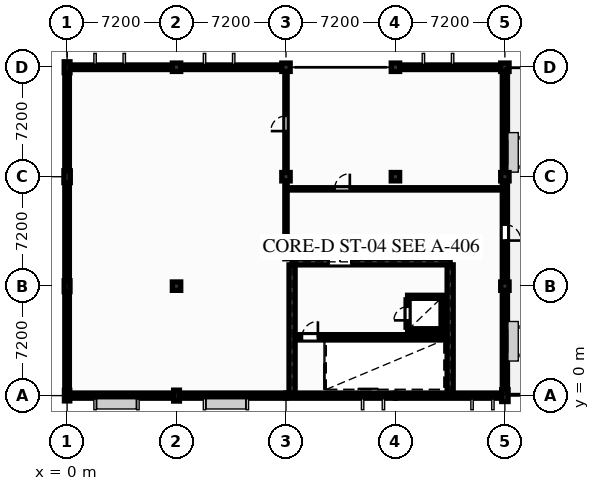
"""IFC4 building model, lengths in metres.
Left out: names, types, materials, properties, quantities, classifications, styles, units other than length and angle.
Written with IfcOpenShell. Run it as: python <this file> out.ifc"""

import sys

from ifc_helpers import new_model, si_unit, direction, frame, frame_2d, origin, origin_with_axes, origin_2d, place, context, subcontext, project, spatial, rectangle, extrude, element, fill, save


model = new_model("IFC4")
c1 = context("Model", 3, precision=1e-05, world=origin(), true_north=direction((0.0, 1.0)))
c2 = subcontext(c1, "Body", "Model", "MODEL_VIEW")
j1 = project(units=[si_unit("LENGTHUNIT", "METRE"), si_unit("PLANEANGLEUNIT", "RADIAN")], contexts=[c1])
p1 = place(None, origin())
s1 = spatial("IfcSite", under=j1, at=p1, CompositionType="ELEMENT")
p2 = place(p1, origin())
s2 = spatial("IfcBuilding", under=s1, at=p2, CompositionType="ELEMENT")
p3 = place(p2, frame((0.0, 0.0, 12.78)))
s3 = spatial("IfcBuildingStorey", under=s2, at=p3, CompositionType="ELEMENT", Elevation=12.78)
p4 = place(p3, frame((0.0, 0.0, 0.0), z_axis=(0.0, 0.0, 1.0), x_axis=(0.0, 1.0, 0.0)))
e1 = element("IfcColumn", 1, at=p4, inside=s3, PredefinedType="PILASTER", context=c2, shape_type="SweptSolid", body=[
    extrude(rectangle(XDim=0.35, YDim=0.7, at=origin_2d()), origin(), (0.0, 0.0, 1.0), 3.74),
])
p5 = place(p3, frame((0.0, 7.2, 0.0), z_axis=(0.0, 0.0, 1.0), x_axis=(1.0, 0.0, 0.0)))
e2 = element("IfcColumn", 2, at=p5, inside=s3, PredefinedType="PILASTER", context=c2, shape_type="SweptSolid", body=[
    extrude(rectangle(XDim=0.38, YDim=0.72, at=origin_2d()), origin(), (0.0, 0.0, 1.0), 3.74),
])
p6 = place(p3, frame((0.0, 14.4, 0.0), z_axis=(0.0, 0.0, 1.0), x_axis=(1.0, 0.0, 0.0)))
e3 = element("IfcColumn", 3, at=p6, inside=s3, PredefinedType="PILASTER", context=c2, shape_type="SweptSolid", body=[
    extrude(rectangle(XDim=0.42, YDim=0.78, at=origin_2d()), origin(), (0.0, 0.0, 1.0), 3.74),
])
for number, where, z_axis, x_axis in (
    (4, (0.0, 21.6, 0.0), (0.0, 0.0, 1.0), (1.0, 0.0, 0.0)),
    (5, (7.2, 0.0, 0.0), (0.0, 0.0, 1.0), (0.0, 1.0, 0.0)),
):
    element("IfcColumn", number, at=place(p3, frame(where, z_axis=z_axis, x_axis=x_axis)), inside=s3, PredefinedType="PILASTER", context=c2, shape_type="SweptSolid", body=[
        extrude(rectangle(XDim=0.38, YDim=0.72, at=origin_2d()), origin(), (0.0, 0.0, 1.0), 3.74),
    ])
for number, where, z_axis, x_axis in (
    (6, (7.2, 7.2, 0.0), (0.0, 0.0, 1.0), (1.0, 0.0, 0.0)),
    (7, (7.2, 21.6, 0.0), (0.0, 0.0, 1.0), (1.0, 0.0, 0.0)),
    (8, (14.4, 14.4, 0.0), (0.0, 0.0, 1.0), (1.0, 0.0, 0.0)),
    (9, (14.4, 21.6, 0.0), (0.0, 0.0, 1.0), (1.0, 0.0, 0.0)),
    (10, (21.6, 14.4, 0.0), (0.0, 0.0, 1.0), (1.0, 0.0, 0.0)),
    (11, (21.6, 21.6, 0.0), (0.0, 0.0, 1.0), (1.0, 0.0, 0.0)),
):
    element("IfcColumn", number, at=place(p3, frame(where, z_axis=z_axis, x_axis=x_axis)), inside=s3, PredefinedType="COLUMN", context=c2, shape_type="SweptSolid", body=[
        extrude(rectangle(XDim=0.55, YDim=0.55, at=origin_2d()), origin(), (0.0, 0.0, 1.0), 3.74),
    ])
p7 = place(p3, frame((28.8, 0.0, 0.0), z_axis=(0.0, 0.0, 1.0), x_axis=(0.0, 1.0, 0.0)))
e12 = element("IfcColumn", 12, at=p7, inside=s3, PredefinedType="PILASTER", context=c2, shape_type="SweptSolid", body=[
    extrude(rectangle(XDim=0.42, YDim=0.78, at=origin_2d()), origin(), (0.0, 0.0, 1.0), 3.74),
])
for number, where, z_axis, x_axis in (
    (13, (28.8, 7.2, 0.0), (0.0, 0.0, 1.0), (1.0, 0.0, 0.0)),
    (14, (28.8, 14.4, 0.0), (0.0, 0.0, 1.0), (1.0, 0.0, 0.0)),
    (15, (28.8, 21.6, 0.0), (0.0, 0.0, 1.0), (1.0, 0.0, 0.0)),
):
    element("IfcColumn", number, at=place(p3, frame(where, z_axis=z_axis, x_axis=x_axis)), inside=s3, PredefinedType="COLUMN", context=c2, shape_type="SweptSolid", body=[
        extrude(rectangle(XDim=0.55, YDim=0.55, at=origin_2d()), origin(), (0.0, 0.0, 1.0), 3.74),
    ])
p8 = place(p3, origin_with_axes())
e16 = element("IfcWall", 16, at=p8, inside=s3, PredefinedType="SOLIDWALL", context=c2, shape_type="SweptSolid", body=[
    extrude(rectangle(XDim=7.2, YDim=0.34, at=frame_2d((3.6, 0.0))), origin(), (0.0, 0.0, 1.0), 3.42),
])
p9 = place(p8, frame((2.0, 0.0, 0.765)))
e17 = element("IfcOpeningElement", 17, at=p9, cuts=e16, PredefinedType="OPENING", context=c2, shape_type="SweptSolid", body=[
    extrude(rectangle(XDim=2.5, YDim=2.0, at=frame_2d((1.25, 1.0))), frame((0.0, 0.18, 0.0), z_axis=(0.0, -1.0, 0.0), x_axis=(1.0, 0.0, 0.0)), (0.0, 0.0, 1.0), 0.36),
])
p10 = place(p3, frame((7.2, 0.0, 0.0), z_axis=(0.0, 0.0, 1.0), x_axis=(1.0, 0.0, 0.0)))
e18 = element("IfcWall", 18, at=p10, inside=s3, PredefinedType="SOLIDWALL", context=c2, shape_type="SweptSolid", body=[
    extrude(rectangle(XDim=7.2, YDim=0.34, at=frame_2d((3.6, 0.0))), origin(), (0.0, 0.0, 1.0), 3.42),
])
p11 = place(p10, frame((2.0, 0.0, 0.85)))
e19 = element("IfcOpeningElement", 19, at=p11, cuts=e18, PredefinedType="OPENING", context=c2, shape_type="SweptSolid", body=[
    extrude(rectangle(XDim=2.5, YDim=2.0, at=frame_2d((1.25, 1.0))), frame((0.0, 0.18, 0.0), z_axis=(0.0, -1.0, 0.0), x_axis=(1.0, 0.0, 0.0)), (0.0, 0.0, 1.0), 0.36),
])
p12 = place(p3, frame((14.4, 0.0, 0.0), z_axis=(0.0, 0.0, 1.0), x_axis=(1.0, 0.0, 0.0)))
e20 = element("IfcWall", 20, at=p12, inside=s3, PredefinedType="SOLIDWALL", context=c2, shape_type="SweptSolid", body=[
    extrude(rectangle(XDim=7.2, YDim=0.34, at=frame_2d((3.6, 0.0))), origin(), (0.0, 0.0, 1.0), 3.42),
])
p13 = place(p12, frame((5.2, 0.0, 1.05)))
e21 = element("IfcOpeningElement", 21, at=p13, cuts=e20, PredefinedType="OPENING", context=c2, shape_type="SweptSolid", body=[
    extrude(rectangle(XDim=1.05, YDim=1.75, at=frame_2d((0.525, 0.875))), frame((0.0, 0.18, 0.0), z_axis=(0.0, -1.0, 0.0), x_axis=(1.0, 0.0, 0.0)), (0.0, 0.0, 1.0), 0.36),
])
p14 = place(p3, frame((21.6, 0.0, 0.0), z_axis=(0.0, 0.0, 1.0), x_axis=(1.0, 0.0, 0.0)))
e22 = element("IfcWall", 22, at=p14, inside=s3, PredefinedType="SOLIDWALL", context=c2, shape_type="SweptSolid", body=[
    extrude(rectangle(XDim=7.2, YDim=0.34, at=frame_2d((3.6, 0.0))), origin(), (0.0, 0.0, 1.0), 3.42),
])
p15 = place(p14, frame((5.2, 0.0, 1.05)))
e23 = element("IfcOpeningElement", 23, at=p15, cuts=e22, PredefinedType="OPENING", context=c2, shape_type="SweptSolid", body=[
    extrude(rectangle(XDim=1.05, YDim=1.75, at=frame_2d((0.525, 0.875))), frame((0.0, 0.18, 0.0), z_axis=(0.0, -1.0, 0.0), x_axis=(1.0, 0.0, 0.0)), (0.0, 0.0, 1.0), 0.36),
])
for number, where, z_axis, x_axis in (
    (24, (0.0, 0.0, 0.0), (0.0, 0.0, 1.0), (0.0, 1.0, 0.0)),
    (25, (0.0, 7.2, 0.0), (0.0, 0.0, 1.0), (0.0, 1.0, 0.0)),
):
    element("IfcWall", number, at=place(p3, frame(where, z_axis=z_axis, x_axis=x_axis)), inside=s3, PredefinedType="SOLIDWALL", context=c2, shape_type="SweptSolid", body=[
        extrude(rectangle(XDim=7.2, YDim=0.3, at=frame_2d((3.6, 0.0))), origin(), (0.0, 0.0, 1.0), 2.805),
    ])
p16 = place(p3, frame((0.0, 14.4, 0.0), z_axis=(0.0, 0.0, 1.0), x_axis=(0.0, 1.0, 0.0)))
e26 = element("IfcWall", 26, at=p16, inside=s3, PredefinedType="SOLIDWALL", context=c2, shape_type="SweptSolid", body=[
    extrude(rectangle(XDim=7.2, YDim=0.3, at=frame_2d((3.6, 0.0))), origin(), (0.0, 0.0, 1.0), 2.805),
])
p17 = place(p3, frame((28.8, 0.0, 0.0), z_axis=(0.0, 0.0, 1.0), x_axis=(0.0, 1.0, 0.0)))
e27 = element("IfcWall", 27, at=p17, inside=s3, PredefinedType="SOLIDWALL", context=c2, shape_type="SweptSolid", body=[
    extrude(rectangle(XDim=21.6, YDim=0.34, at=frame_2d((10.8, 0.0))), origin(), (0.0, 0.0, 1.0), 3.42),
])
p18 = place(p17, frame((10.2, 0.0, 0.0)))
e28 = element("IfcOpeningElement", 28, at=p18, cuts=e27, PredefinedType="OPENING", context=c2, shape_type="SweptSolid", body=[
    extrude(rectangle(XDim=1.05, YDim=2.2, at=frame_2d((0.525, 1.1))), frame((0.0, 0.18, 0.0), z_axis=(0.0, -1.0, 0.0), x_axis=(1.0, 0.0, 0.0)), (0.0, 0.0, 1.0), 0.36),
])
p19 = place(p17, frame((2.8, 0.0, 0.695)))
e29 = element("IfcOpeningElement", 29, at=p19, cuts=e27, PredefinedType="OPENING", context=c2, shape_type="SweptSolid", body=[
    extrude(rectangle(XDim=1.55, YDim=1.95, at=frame_2d((0.775, 0.975))), frame((0.0, 0.18, 0.0), z_axis=(0.0, -1.0, 0.0), x_axis=(1.0, 0.0, 0.0)), (0.0, 0.0, 1.0), 0.36),
])
p20 = place(p17, frame((15.2, 0.0, 0.595)))
e30 = element("IfcOpeningElement", 30, at=p20, cuts=e27, PredefinedType="OPENING", context=c2, shape_type="SweptSolid", body=[
    extrude(rectangle(XDim=1.6, YDim=2.05, at=frame_2d((0.8, 1.025))), frame((0.0, 0.18, 0.0), z_axis=(0.0, -1.0, 0.0), x_axis=(1.0, 0.0, 0.0)), (0.0, 0.0, 1.0), 0.36),
])
p21 = place(p3, frame((0.0, 21.6, 0.0), z_axis=(0.0, 0.0, 1.0), x_axis=(1.0, 0.0, 0.0)))
e31 = element("IfcWall", 31, at=p21, inside=s3, PredefinedType="SOLIDWALL", context=c2, shape_type="SweptSolid", body=[
    extrude(rectangle(XDim=7.2, YDim=0.3, at=frame_2d((3.6, 0.0))), origin(), (0.0, 0.0, 1.0), 2.805),
])
p22 = place(p21, frame((2.0, 0.0, 0.635)))
e32 = element("IfcOpeningElement", 32, at=p22, cuts=e31, PredefinedType="OPENING", context=c2, shape_type="SweptSolid", body=[
    extrude(rectangle(XDim=1.6, YDim=2.05, at=frame_2d((0.8, 1.025))), frame((0.0, 0.16, 0.0), z_axis=(0.0, -1.0, 0.0), x_axis=(1.0, 0.0, 0.0)), (0.0, 0.0, 1.0), 0.32),
])
p23 = place(p3, frame((7.2, 21.6, 0.0), z_axis=(0.0, 0.0, 1.0), x_axis=(1.0, 0.0, 0.0)))
e33 = element("IfcWall", 33, at=p23, inside=s3, PredefinedType="SOLIDWALL", context=c2, shape_type="SweptSolid", body=[
    extrude(rectangle(XDim=7.2, YDim=0.3, at=frame_2d((3.6, 0.0))), origin(), (0.0, 0.0, 1.0), 2.805),
])
p24 = place(p23, frame((2.0, 0.0, 0.635)))
e34 = element("IfcOpeningElement", 34, at=p24, cuts=e33, PredefinedType="OPENING", context=c2, shape_type="SweptSolid", body=[
    extrude(rectangle(XDim=1.6, YDim=2.05, at=frame_2d((0.8, 1.025))), frame((0.0, 0.16, 0.0), z_axis=(0.0, -1.0, 0.0), x_axis=(1.0, 0.0, 0.0)), (0.0, 0.0, 1.0), 0.32),
])
p25 = place(p3, frame((21.6, 21.6, 0.0), z_axis=(0.0, 0.0, 1.0), x_axis=(1.0, 0.0, 0.0)))
e35 = element("IfcWall", 35, at=p25, inside=s3, PredefinedType="SOLIDWALL", context=c2, shape_type="SweptSolid", body=[
    extrude(rectangle(XDim=7.2, YDim=0.3, at=frame_2d((3.6, 0.0))), origin(), (0.0, 0.0, 1.0), 2.805),
])
p26 = place(p25, frame((2.0, 0.0, 0.635)))
e36 = element("IfcOpeningElement", 36, at=p26, cuts=e35, PredefinedType="OPENING", context=c2, shape_type="SweptSolid", body=[
    extrude(rectangle(XDim=1.6, YDim=2.05, at=frame_2d((0.8, 1.025))), frame((0.0, 0.16, 0.0), z_axis=(0.0, -1.0, 0.0), x_axis=(1.0, 0.0, 0.0)), (0.0, 0.0, 1.0), 0.32),
])
p27 = place(p3, frame((14.8, 8.8, 0.0), z_axis=(0.0, 0.0, 1.0), x_axis=(1.0, 0.0, 0.0)))
e37 = element("IfcWall", 37, at=p27, inside=s3, PredefinedType="SHEAR", context=c2, shape_type="SweptSolid", body=[
    extrude(rectangle(XDim=10.4, YDim=0.4, at=frame_2d((5.2, 0.0))), origin(), (0.0, 0.0, 1.0), 3.42),
])
p28 = place(p27, frame((2.4, 0.0, 0.0)))
e38 = element("IfcOpeningElement", 38, at=p28, cuts=e37, PredefinedType="OPENING", context=c2, shape_type="SweptSolid", body=[
    extrude(rectangle(XDim=1.5, YDim=2.2, at=frame_2d((0.75, 1.1))), frame((0.0, 0.21, 0.0), z_axis=(0.0, -1.0, 0.0), x_axis=(1.0, 0.0, 0.0)), (0.0, 0.0, 1.0), 0.42),
])
for number, where, z_axis, x_axis in (
    (39, (14.8, 0.17, 0.0), (0.0, 0.0, 1.0), (0.0, 1.0, 0.0)),
    (40, (25.2, 0.17, 0.0), (0.0, 0.0, 1.0), (0.0, 1.0, 0.0)),
):
    element("IfcWall", number, at=place(p3, frame(where, z_axis=z_axis, x_axis=x_axis)), inside=s3, PredefinedType="SHEAR", context=c2, shape_type="SweptSolid", body=[
        extrude(rectangle(XDim=8.43, YDim=0.4, at=frame_2d((4.215, 0.0))), origin(), (0.0, 0.0, 1.0), 3.42),
    ])
p29 = place(p3, frame((15.0, 3.835, 0.0), z_axis=(0.0, 0.0, 1.0), x_axis=(1.0, 0.0, 0.0)))
e41 = element("IfcWall", 41, at=p29, inside=s3, PredefinedType="SHEAR", context=c2, shape_type="SweptSolid", body=[
    extrude(rectangle(XDim=10.0, YDim=0.35, at=frame_2d((5.0, 0.0))), origin(), (0.0, 0.0, 1.0), 3.42),
])
p30 = place(p29, frame((0.45, 0.0, 0.0)))
e42 = element("IfcOpeningElement", 42, at=p30, cuts=e41, PredefinedType="OPENING", context=c2, shape_type="SweptSolid", body=[
    extrude(rectangle(XDim=1.05, YDim=2.2, at=frame_2d((0.525, 1.1))), frame((0.0, 0.185, 0.0), z_axis=(0.0, -1.0, 0.0), x_axis=(1.0, 0.0, 0.0)), (0.0, 0.0, 1.0), 0.37),
])
for number, where, z_axis, x_axis in (
    (43, (22.4, 4.3, 0.0), (0.0, 0.0, 1.0), (1.0, 0.0, 0.0)),
    (44, (22.4, 6.5, 0.0), (0.0, 0.0, 1.0), (1.0, 0.0, 0.0)),
):
    element("IfcWall", number, at=place(p3, frame(where, z_axis=z_axis, x_axis=x_axis)), inside=s3, PredefinedType="PARTITIONING", context=c2, shape_type="SweptSolid", body=[
        extrude(rectangle(XDim=2.3, YDim=0.2, at=frame_2d((1.15, 0.0))), origin(), (0.0, 0.0, 1.0), 3.42),
    ])
p31 = place(p3, frame((22.4, 4.5, 0.0), z_axis=(0.0, 0.0, 1.0), x_axis=(0.0, 1.0, 0.0)))
e45 = element("IfcWall", 45, at=p31, inside=s3, PredefinedType="PARTITIONING", context=c2, shape_type="SweptSolid", body=[
    extrude(rectangle(XDim=1.8, YDim=0.2, at=frame_2d((0.9, 0.0))), origin(), (0.0, 0.0, 1.0), 3.42),
])
p32 = place(p31, frame((0.45, 0.0, 0.0)))
e46 = element("IfcOpeningElement", 46, at=p32, cuts=e45, PredefinedType="OPENING", context=c2, shape_type="SweptSolid", body=[
    extrude(rectangle(XDim=0.9, YDim=2.1, at=frame_2d((0.45, 1.05))), frame((0.0, 0.11, 0.0), z_axis=(0.0, -1.0, 0.0), x_axis=(1.0, 0.0, 0.0)), (0.0, 0.0, 1.0), 0.22),
])
p33 = place(p3, frame((24.7, 4.5, 0.0), z_axis=(0.0, 0.0, 1.0), x_axis=(0.0, 1.0, 0.0)))
e47 = element("IfcWall", 47, at=p33, inside=s3, PredefinedType="PARTITIONING", context=c2, shape_type="SweptSolid", body=[
    extrude(rectangle(XDim=1.8, YDim=0.2, at=frame_2d((0.9, 0.0))), origin(), (0.0, 0.0, 1.0), 3.42),
])
p34 = place(p3, frame((14.4, 9.0, 0.0), z_axis=(0.0, 0.0, 1.0), x_axis=(0.0, 1.0, 0.0)))
e48 = element("IfcWall", 48, at=p34, inside=s3, PredefinedType="PARTITIONING", context=c2, shape_type="SweptSolid", body=[
    extrude(rectangle(XDim=12.6, YDim=0.15, at=frame_2d((6.3, 0.0))), origin(), (0.0, 0.0, 1.0), 2.685),
])
p35 = place(p34, frame((8.4, 0.0, 0.0)))
e49 = element("IfcOpeningElement", 49, at=p35, cuts=e48, PredefinedType="OPENING", context=c2, shape_type="SweptSolid", body=[
    extrude(rectangle(XDim=1.0, YDim=2.15, at=frame_2d((0.5, 1.075))), frame((0.0, 0.085, 0.0), z_axis=(0.0, -1.0, 0.0), x_axis=(1.0, 0.0, 0.0)), (0.0, 0.0, 1.0), 0.17),
])
p36 = place(p3, frame((14.6, 13.6, 0.0), z_axis=(0.0, 0.0, 1.0), x_axis=(1.0, 0.0, 0.0)))
e50 = element("IfcWall", 50, at=p36, inside=s3, PredefinedType="PARTITIONING", context=c2, shape_type="SweptSolid", body=[
    extrude(rectangle(XDim=14.2, YDim=0.15, at=frame_2d((7.1, 0.0))), origin(), (0.0, 0.0, 1.0), 3.42),
])
p37 = place(p36, frame((3.0, 0.0, 0.0)))
e51 = element("IfcOpeningElement", 51, at=p37, cuts=e50, PredefinedType="OPENING", context=c2, shape_type="SweptSolid", body=[
    extrude(rectangle(XDim=1.0, YDim=2.15, at=frame_2d((0.5, 1.075))), frame((0.0, 0.085, 0.0), z_axis=(0.0, -1.0, 0.0), x_axis=(1.0, 0.0, 0.0)), (0.0, 0.0, 1.0), 0.17),
])
p38 = place(p9, origin())
e52 = element("IfcWindow", 52, at=p38, inside=s3, PartitioningType="SINGLE_PANEL", PredefinedType="WINDOW", context=c2, shape_type="SweptSolid", body=[
    extrude(rectangle(XDim=2.5, YDim=2.0, at=frame_2d((1.25, 1.0))), frame((0.0, 0.03, 0.0), z_axis=(0.0, -1.0, 0.0), x_axis=(1.0, 0.0, 0.0)), (0.0, 0.0, 1.0), 0.06),
])
fill(e17, e52)
p39 = place(p11, origin())
e53 = element("IfcWindow", 53, at=p39, inside=s3, PartitioningType="SINGLE_PANEL", PredefinedType="WINDOW", context=c2, shape_type="SweptSolid", body=[
    extrude(rectangle(XDim=2.5, YDim=2.0, at=frame_2d((1.25, 1.0))), frame((0.0, 0.03, 0.0), z_axis=(0.0, -1.0, 0.0), x_axis=(1.0, 0.0, 0.0)), (0.0, 0.0, 1.0), 0.06),
])
fill(e19, e53)
p40 = place(p13, origin())
e54 = element("IfcWindow", 54, at=p40, inside=s3, PartitioningType="SINGLE_PANEL", PredefinedType="WINDOW", context=c2, shape_type="SweptSolid", body=[
    extrude(rectangle(XDim=1.05, YDim=1.75, at=frame_2d((0.525, 0.875))), frame((0.0, 0.03, 0.0), z_axis=(0.0, -1.0, 0.0), x_axis=(1.0, 0.0, 0.0)), (0.0, 0.0, 1.0), 0.06),
])
fill(e21, e54)
p41 = place(p15, origin())
e55 = element("IfcWindow", 55, at=p41, inside=s3, PartitioningType="SINGLE_PANEL", PredefinedType="WINDOW", context=c2, shape_type="SweptSolid", body=[
    extrude(rectangle(XDim=1.05, YDim=1.75, at=frame_2d((0.525, 0.875))), frame((0.0, 0.03, 0.0), z_axis=(0.0, -1.0, 0.0), x_axis=(1.0, 0.0, 0.0)), (0.0, 0.0, 1.0), 0.06),
])
fill(e23, e55)
p42 = place(p18, frame((1.05, 0.0, 0.0), z_axis=(0.0, 0.0, 1.0), x_axis=(-1.0, 0.0, 0.0)))
e56 = element("IfcDoor", 56, at=p42, inside=s3, OperationType="SINGLE_SWING_LEFT", PredefinedType="DOOR", context=c2, shape_type="SweptSolid", body=[
    extrude(rectangle(XDim=1.05, YDim=2.2, at=frame_2d((0.525, 1.1))), frame((0.0, 0.025, 0.0), z_axis=(0.0, -1.0, 0.0), x_axis=(1.0, 0.0, 0.0)), (0.0, 0.0, 1.0), 0.05),
])
fill(e28, e56)
p43 = place(p19, origin())
e57 = element("IfcWindow", 57, at=p43, inside=s3, PartitioningType="SINGLE_PANEL", PredefinedType="WINDOW", context=c2, shape_type="SweptSolid", body=[
    extrude(rectangle(XDim=1.55, YDim=1.95, at=frame_2d((0.775, 0.975))), frame((0.0, 0.03, 0.0), z_axis=(0.0, -1.0, 0.0), x_axis=(1.0, 0.0, 0.0)), (0.0, 0.0, 1.0), 0.06),
])
fill(e29, e57)
p44 = place(p20, origin())
e58 = element("IfcWindow", 58, at=p44, inside=s3, PartitioningType="SINGLE_PANEL", PredefinedType="WINDOW", context=c2, shape_type="SweptSolid", body=[
    extrude(rectangle(XDim=1.6, YDim=2.05, at=frame_2d((0.8, 1.025))), frame((0.0, 0.03, 0.0), z_axis=(0.0, -1.0, 0.0), x_axis=(1.0, 0.0, 0.0)), (0.0, 0.0, 1.0), 0.06),
])
fill(e30, e58)
p45 = place(p22, origin())
e59 = element("IfcWindow", 59, at=p45, inside=s3, PartitioningType="SINGLE_PANEL", PredefinedType="WINDOW", context=c2, shape_type="SweptSolid", body=[
    extrude(rectangle(XDim=1.6, YDim=2.05, at=frame_2d((0.8, 1.025))), frame((0.0, 0.03, 0.0), z_axis=(0.0, -1.0, 0.0), x_axis=(1.0, 0.0, 0.0)), (0.0, 0.0, 1.0), 0.06),
])
fill(e32, e59)
p46 = place(p24, origin())
e60 = element("IfcWindow", 60, at=p46, inside=s3, PartitioningType="SINGLE_PANEL", PredefinedType="WINDOW", context=c2, shape_type="SweptSolid", body=[
    extrude(rectangle(XDim=1.6, YDim=2.05, at=frame_2d((0.8, 1.025))), frame((0.0, 0.03, 0.0), z_axis=(0.0, -1.0, 0.0), x_axis=(1.0, 0.0, 0.0)), (0.0, 0.0, 1.0), 0.06),
])
fill(e34, e60)
p47 = place(p26, origin())
e61 = element("IfcWindow", 61, at=p47, inside=s3, PartitioningType="SINGLE_PANEL", PredefinedType="WINDOW", context=c2, shape_type="SweptSolid", body=[
    extrude(rectangle(XDim=1.6, YDim=2.05, at=frame_2d((0.8, 1.025))), frame((0.0, 0.03, 0.0), z_axis=(0.0, -1.0, 0.0), x_axis=(1.0, 0.0, 0.0)), (0.0, 0.0, 1.0), 0.06),
])
fill(e36, e61)
p48 = place(p28, origin())
e62 = element("IfcDoor", 62, at=p48, inside=s3, OperationType="DOUBLE_DOOR_SINGLE_SWING", PredefinedType="DOOR", context=c2, shape_type="SweptSolid", body=[
    extrude(rectangle(XDim=1.5, YDim=2.2, at=frame_2d((0.75, 1.1))), frame((0.0, 0.025, 0.0), z_axis=(0.0, -1.0, 0.0), x_axis=(1.0, 0.0, 0.0)), (0.0, 0.0, 1.0), 0.05),
])
fill(e38, e62)
p49 = place(p30, origin())
e63 = element("IfcDoor", 63, at=p49, inside=s3, OperationType="SINGLE_SWING_RIGHT", PredefinedType="DOOR", context=c2, shape_type="SweptSolid", body=[
    extrude(rectangle(XDim=1.05, YDim=2.2, at=frame_2d((0.525, 1.1))), frame((0.0, 0.025, 0.0), z_axis=(0.0, -1.0, 0.0), x_axis=(1.0, 0.0, 0.0)), (0.0, 0.0, 1.0), 0.05),
])
fill(e42, e63)
p50 = place(p32, origin())
e64 = element("IfcDoor", 64, at=p50, inside=s3, OperationType="SINGLE_SWING_LEFT", PredefinedType="DOOR", context=c2, shape_type="SweptSolid", body=[
    extrude(rectangle(XDim=0.9, YDim=2.1, at=frame_2d((0.45, 1.05))), frame((0.0, 0.025, 0.0), z_axis=(0.0, -1.0, 0.0), x_axis=(1.0, 0.0, 0.0)), (0.0, 0.0, 1.0), 0.05),
])
fill(e46, e64)
p51 = place(p35, origin())
e65 = element("IfcDoor", 65, at=p51, inside=s3, OperationType="SINGLE_SWING_LEFT", PredefinedType="DOOR", context=c2, shape_type="SweptSolid", body=[
    extrude(rectangle(XDim=1.0, YDim=2.15, at=frame_2d((0.5, 1.075))), frame((0.0, 0.025, 0.0), z_axis=(0.0, -1.0, 0.0), x_axis=(1.0, 0.0, 0.0)), (0.0, 0.0, 1.0), 0.05),
])
fill(e49, e65)
p52 = place(p37, origin())
e66 = element("IfcDoor", 66, at=p52, inside=s3, OperationType="SINGLE_SWING_RIGHT", PredefinedType="DOOR", context=c2, shape_type="SweptSolid", body=[
    extrude(rectangle(XDim=1.0, YDim=2.15, at=frame_2d((0.5, 1.075))), frame((0.0, 0.025, 0.0), z_axis=(0.0, -1.0, 0.0), x_axis=(1.0, 0.0, 0.0)), (0.0, 0.0, 1.0), 0.05),
])
fill(e51, e66)
save(model, sys.argv[1])
